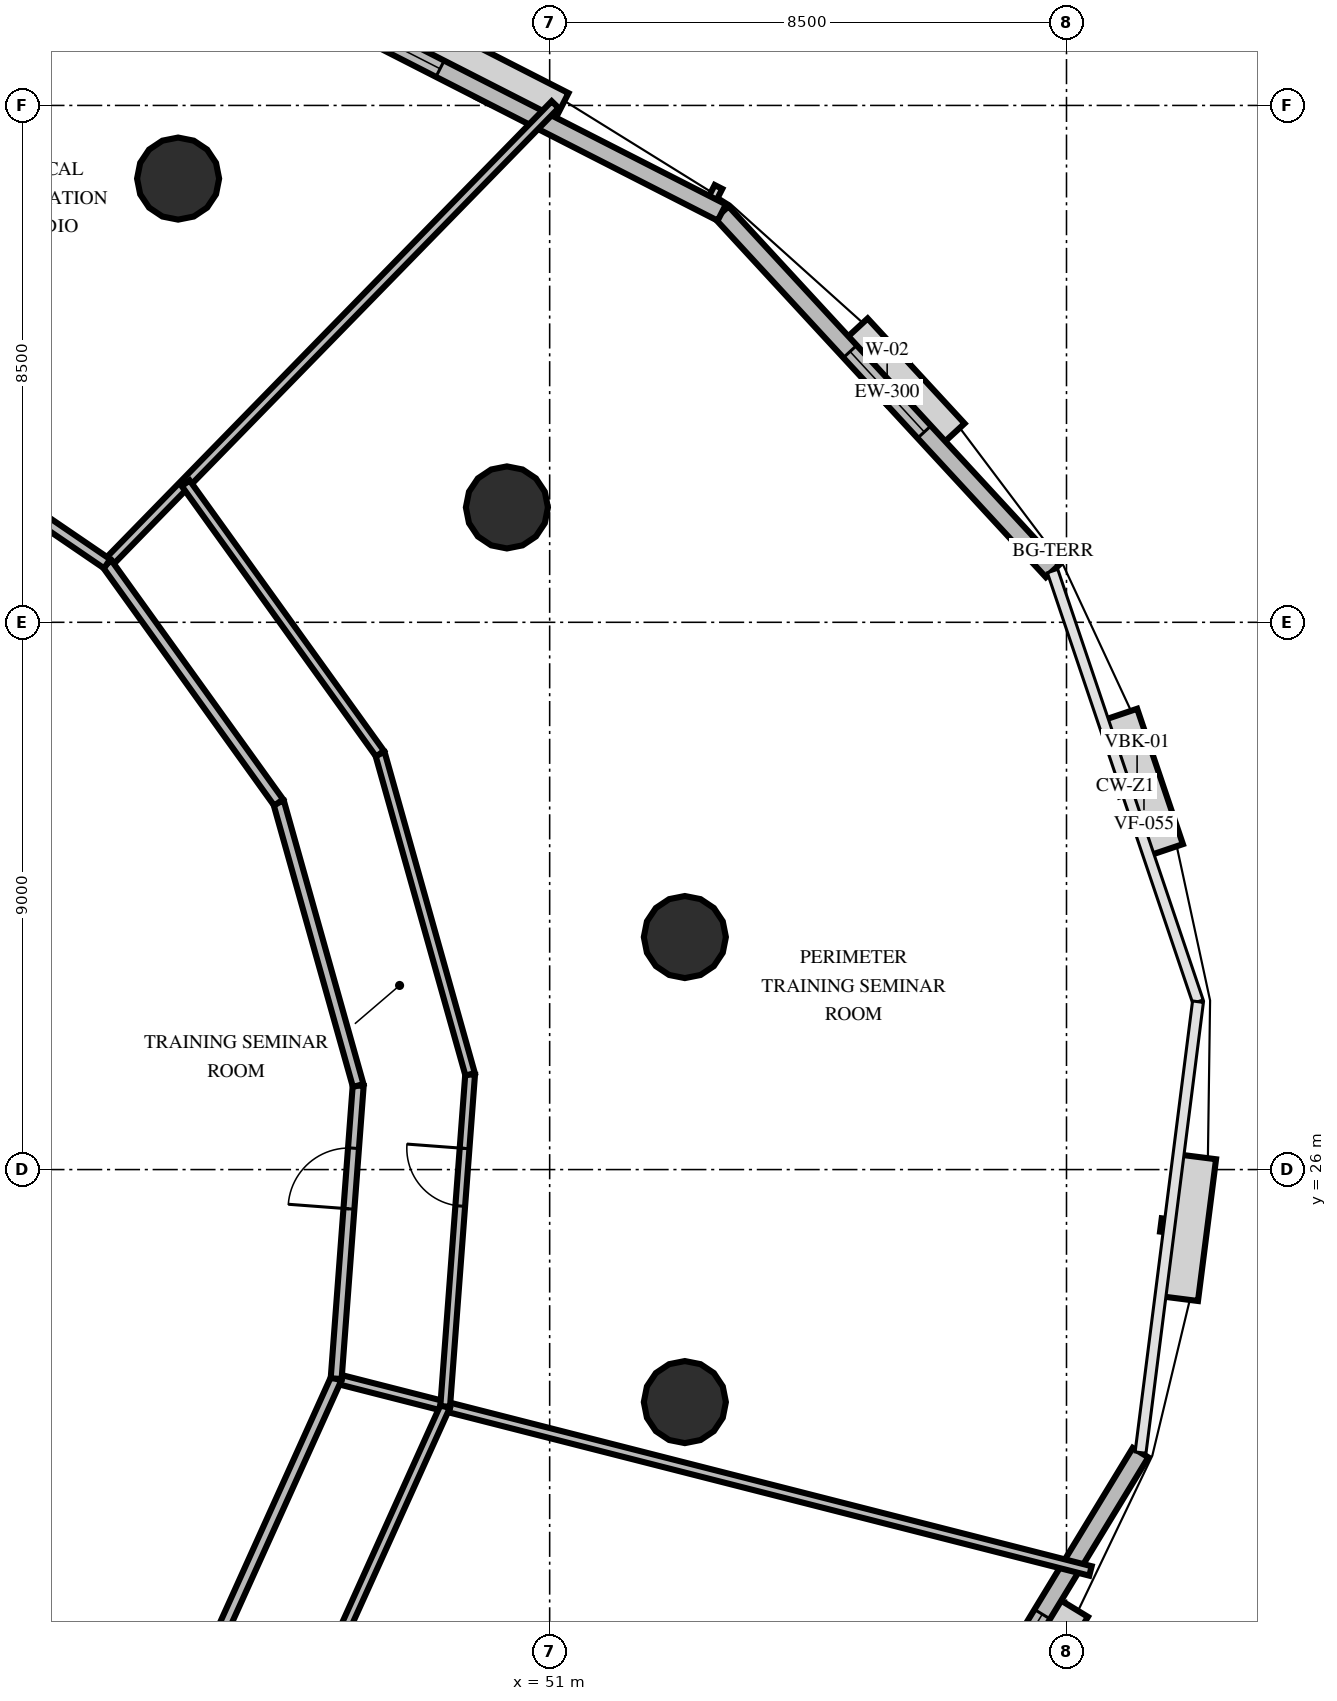
"""IFC4 building model, lengths in metres.
Left out: names, types, materials, properties, quantities, classifications, styles, units other than length and angle.
Written with IfcOpenShell. Run it as: python <this file> out.ifc"""

import sys

from ifc_helpers import new_model, si_unit, direction, frame, frame_2d, origin, origin_2d, place, context, subcontext, project, spatial, rectangle, circle, extrude, element, fill, save


model = new_model("IFC4")
c1 = context("Model", 3, precision=1e-05, world=origin(), true_north=direction((0.0, 1.0)))
c2 = subcontext(c1, "Body", "Model", "MODEL_VIEW")
j1 = project(units=[si_unit("LENGTHUNIT", "METRE"), si_unit("PLANEANGLEUNIT", "RADIAN")], contexts=[c1])
p1 = place(None, origin())
s1 = spatial("IfcSite", under=j1, at=p1, CompositionType="ELEMENT")
p2 = place(p1, origin())
s2 = spatial("IfcBuilding", under=s1, at=p2, CompositionType="ELEMENT")
p3 = place(p2, frame((0.0, 0.0, 55.2)))
s3 = spatial("IfcBuildingStorey", under=s2, at=p3, CompositionType="ELEMENT", Elevation=55.2)
for number, where, z_axis, x_axis in (
    (1, (53.223, 29.824, 0.0), (0.0, 0.0, 1.0), (1.0, 0.0, 0.0)),
    (2, (50.297, 36.889, 0.0), (0.0, 0.0, 1.0), (1.0, 0.0, 0.0)),
    (3, (44.889, 42.297, 0.0), (0.0, 0.0, 1.0), (1.0, 0.0, 0.0)),
    (4, (53.223, 22.176, 0.0), (0.0, 0.0, 1.0), (1.0, 0.0, 0.0)),
):
    element("IfcColumn", number, at=place(p3, frame(where, z_axis=z_axis, x_axis=x_axis)), inside=s3, PredefinedType="COLUMN", context=c2, shape_type="SweptSolid", body=[
        extrude(circle(Radius=0.675, at=origin_2d()), origin(), (0.0, 0.0, 1.0), 4.2),
    ])
p4 = place(p3, frame((59.271, 35.844, 0.0), z_axis=(0.0, 0.0, 1.0), x_axis=(-0.678156213245, 0.734917784815, 0.0)))
e5 = element("IfcWall", 5, at=p4, inside=s3, PredefinedType="SOLIDWALL", context=c2, shape_type="SweptSolid", body=[
    extrude(rectangle(XDim=8.022, YDim=0.3, at=frame_2d((4.011, 0.0))), origin(), (0.0, 0.0, 1.0), 3.0),
])
p5 = place(p4, frame((3.111, 0.0, 0.8)))
e6 = element("IfcOpeningElement", 6, at=p5, cuts=e5, PredefinedType="OPENING", context=c2, shape_type="SweptSolid", body=[
    extrude(rectangle(XDim=1.8, YDim=1.95, at=frame_2d((0.9, 0.975))), frame((0.0, 0.16, 0.0), z_axis=(0.0, -1.0, 0.0), x_axis=(1.0, 0.0, 0.0)), (0.0, 0.0, 1.0), 0.32),
])
p6 = place(p3, frame((53.831, 41.739, 0.0), z_axis=(0.0, 0.0, 1.0), x_axis=(-0.890709330384, 0.454573304063, 0.0)))
e7 = element("IfcWall", 7, at=p6, inside=s3, PredefinedType="SOLIDWALL", context=c2, shape_type="SweptSolid", body=[
    extrude(rectangle(XDim=8.792, YDim=0.3, at=frame_2d((4.396, 0.0))), origin(), (0.0, 0.0, 1.0), 3.0),
])
p7 = place(p6, frame((5.202, 0.0, 0.8)))
e8 = element("IfcOpeningElement", 8, at=p7, cuts=e7, PredefinedType="OPENING", context=c2, shape_type="SweptSolid", body=[
    extrude(rectangle(XDim=1.8, YDim=1.95, at=frame_2d((0.9, 0.975))), frame((0.0, 0.16, 0.0), z_axis=(0.0, -1.0, 0.0), x_axis=(1.0, 0.0, 0.0)), (0.0, 0.0, 1.0), 0.32),
])
p8 = place(p3, frame((56.551, 14.491, 0.0), z_axis=(0.0, 0.0, 1.0), x_axis=(0.519499833869, 0.854470551049, 0.0)))
e9 = element("IfcWall", 9, at=p8, inside=s3, PredefinedType="SOLIDWALL", context=c2, shape_type="SweptSolid", body=[
    extrude(rectangle(XDim=8.022, YDim=0.3, at=frame_2d((4.011, 0.0))), origin(), (0.0, 0.0, 1.0), 3.0),
])
p9 = place(p8, frame((3.111, 0.0, 0.8)))
e10 = element("IfcOpeningElement", 10, at=p9, cuts=e9, PredefinedType="OPENING", context=c2, shape_type="SweptSolid", body=[
    extrude(rectangle(XDim=1.8, YDim=1.95, at=frame_2d((0.9, 0.975))), frame((0.0, 0.16, 0.0), z_axis=(0.0, -1.0, 0.0), x_axis=(1.0, 0.0, 0.0)), (0.0, 0.0, 1.0), 0.32),
])
p10 = place(p3, frame((47.489, 22.562, 0.0), z_axis=(0.0, 0.0, 1.0), x_axis=(0.969016056797, -0.246997736163, 0.0)))
e11 = element("IfcWall", 11, at=p10, inside=s3, PredefinedType="PARTITIONING", context=c2, shape_type="SweptSolid", body=[
    extrude(rectangle(XDim=12.802, YDim=0.16, at=frame_2d((6.401, 0.0))), origin(), (0.0, 0.0, 1.0), 3.0),
])
p11 = place(p3, frame((45.499, 18.156, 0.0), z_axis=(0.0, 0.0, 1.0), x_axis=(0.411533950862, 0.911394430139, 0.0)))
e12 = element("IfcWall", 12, at=p11, inside=s3, PredefinedType="PARTITIONING", context=c2, shape_type="SweptSolid", body=[
    extrude(rectangle(XDim=4.834, YDim=0.18, at=frame_2d((2.417, 0.0))), origin(), (0.0, 0.0, 1.0), 3.0),
])
p12 = place(p3, frame((47.028, 17.113, 0.0), z_axis=(0.0, 0.0, 1.0), x_axis=(0.411541335113, 0.911391095795, 0.0)))
e13 = element("IfcWall", 13, at=p12, inside=s3, PredefinedType="PARTITIONING", context=c2, shape_type="SweptSolid", body=[
    extrude(rectangle(XDim=5.477, YDim=0.16, at=frame_2d((2.738, 0.0))), origin(), (0.0, 0.0, 1.0), 3.0),
])
p13 = place(p3, frame((43.722, 35.962, 0.0), z_axis=(0.0, 0.0, 1.0), x_axis=(0.698422740354, 0.715685458673, 0.0)))
e14 = element("IfcWall", 14, at=p13, inside=s3, PredefinedType="PARTITIONING", context=c2, shape_type="SweptSolid", body=[
    extrude(rectangle(XDim=10.551, YDim=0.16, at=frame_2d((5.275, 0.0))), origin(), (0.0, 0.0, 1.0), 3.0),
])
p14 = place(p3, frame((47.489, 22.562, 0.0), z_axis=(0.0, 0.0, 1.0), x_axis=(0.074993329919, 0.997184035406, 0.0)))
e15 = element("IfcWall", 15, at=p14, inside=s3, PredefinedType="PARTITIONING", context=c2, shape_type="SweptSolid", body=[
    extrude(rectangle(XDim=4.834, YDim=0.18, at=frame_2d((2.417, 0.0))), origin(), (0.0, 0.0, 1.0), 3.0),
])
p15 = place(p14, frame((2.801, 0.0, 0.0)))
e16 = element("IfcOpeningElement", 16, at=p15, cuts=e15, PredefinedType="OPENING", context=c2, shape_type="SweptSolid", body=[
    extrude(rectangle(XDim=1.0, YDim=2.15, at=frame_2d((0.5, 1.075))), frame((0.0, 0.1, 0.0), z_axis=(0.0, -1.0, 0.0), x_axis=(1.0, 0.0, 0.0)), (0.0, 0.0, 1.0), 0.2),
])
p16 = place(p3, frame((47.851, 27.383, 0.0), z_axis=(0.0, 0.0, 1.0), x_axis=(-0.270630041705, 0.962683426951, 0.0)))
e17 = element("IfcWall", 17, at=p16, inside=s3, PredefinedType="PARTITIONING", context=c2, shape_type="SweptSolid", body=[
    extrude(rectangle(XDim=4.834, YDim=0.18, at=frame_2d((2.417, 0.0))), origin(), (0.0, 0.0, 1.0), 3.0),
])
p17 = place(p3, frame((46.543, 32.037, 0.0), z_axis=(0.0, 0.0, 1.0), x_axis=(-0.583552796145, 0.812075202251, 0.0)))
e18 = element("IfcWall", 18, at=p17, inside=s3, PredefinedType="PARTITIONING", context=c2, shape_type="SweptSolid", body=[
    extrude(rectangle(XDim=4.834, YDim=0.18, at=frame_2d((2.417, 0.0))), origin(), (0.0, 0.0, 1.0), 3.0),
])
p18 = place(p3, frame((49.281, 22.105, 0.0), z_axis=(0.0, 0.0, 1.0), x_axis=(0.074930681693, 0.997188744893, 0.0)))
e19 = element("IfcWall", 19, at=p18, inside=s3, PredefinedType="PARTITIONING", context=c2, shape_type="SweptSolid", body=[
    extrude(rectangle(XDim=5.477, YDim=0.16, at=frame_2d((2.739, 0.0))), origin(), (0.0, 0.0, 1.0), 3.0),
])
p19 = place(p18, frame((3.305, 0.0, 0.0)))
e20 = element("IfcOpeningElement", 20, at=p19, cuts=e19, PredefinedType="OPENING", context=c2, shape_type="SweptSolid", body=[
    extrude(rectangle(XDim=0.95, YDim=2.15, at=frame_2d((0.475, 1.075))), frame((0.0, 0.09, 0.0), z_axis=(0.0, -1.0, 0.0), x_axis=(1.0, 0.0, 0.0)), (0.0, 0.0, 1.0), 0.18),
])
p20 = place(p3, frame((49.692, 27.566, 0.0), z_axis=(0.0, 0.0, 1.0), x_axis=(-0.270585497548, 0.962695948115, 0.0)))
e21 = element("IfcWall", 21, at=p20, inside=s3, PredefinedType="PARTITIONING", context=c2, shape_type="SweptSolid", body=[
    extrude(rectangle(XDim=5.477, YDim=0.16, at=frame_2d((2.738, 0.0))), origin(), (0.0, 0.0, 1.0), 3.0),
])
p21 = place(p3, frame((48.21, 32.839, 0.0), z_axis=(0.0, 0.0, 1.0), x_axis=(-0.5835423575, 0.812082703303, 0.0)))
e22 = element("IfcWall", 22, at=p21, inside=s3, PredefinedType="PARTITIONING", context=c2, shape_type="SweptSolid", body=[
    extrude(rectangle(XDim=5.477, YDim=0.16, at=frame_2d((2.739, 0.0))), origin(), (0.0, 0.0, 1.0), 3.0),
])
p22 = place(p3, frame((43.722, 35.962, 0.0), z_axis=(0.0, 0.0, 1.0), x_axis=(-0.826090560553, 0.563537386307, 0.0)))
e23 = element("IfcWall", 23, at=p22, inside=s3, PredefinedType="PARTITIONING", context=c2, shape_type="SweptSolid", body=[
    extrude(rectangle(XDim=4.834, YDim=0.18, at=frame_2d((2.417, 0.0))), origin(), (0.0, 0.0, 1.0), 3.0),
])
p23 = place(p5, origin())
e24 = element("IfcWindow", 24, at=p23, inside=s3, PartitioningType="SINGLE_PANEL", PredefinedType="WINDOW", context=c2, shape_type="SweptSolid", body=[
    extrude(rectangle(XDim=1.8, YDim=1.95, at=frame_2d((0.9, 0.975))), frame((0.0, 0.03, 0.0), z_axis=(0.0, -1.0, 0.0), x_axis=(1.0, 0.0, 0.0)), (0.0, 0.0, 1.0), 0.06),
])
fill(e6, e24)
p24 = place(p7, origin())
e25 = element("IfcWindow", 25, at=p24, inside=s3, PartitioningType="SINGLE_PANEL", PredefinedType="WINDOW", context=c2, shape_type="SweptSolid", body=[
    extrude(rectangle(XDim=1.8, YDim=1.95, at=frame_2d((0.9, 0.975))), frame((0.0, 0.03, 0.0), z_axis=(0.0, -1.0, 0.0), x_axis=(1.0, 0.0, 0.0)), (0.0, 0.0, 1.0), 0.06),
])
fill(e8, e25)
p25 = place(p9, origin())
e26 = element("IfcWindow", 26, at=p25, inside=s3, PartitioningType="SINGLE_PANEL", PredefinedType="WINDOW", context=c2, shape_type="SweptSolid", body=[
    extrude(rectangle(XDim=1.8, YDim=1.95, at=frame_2d((0.9, 0.975))), frame((0.0, 0.03, 0.0), z_axis=(0.0, -1.0, 0.0), x_axis=(1.0, 0.0, 0.0)), (0.0, 0.0, 1.0), 0.06),
])
fill(e10, e26)
p26 = place(p15, origin())
e27 = element("IfcDoor", 27, at=p26, inside=s3, OperationType="SINGLE_SWING_LEFT", PredefinedType="DOOR", context=c2, shape_type="SweptSolid", body=[
    extrude(rectangle(XDim=1.0, YDim=2.15, at=frame_2d((0.5, 1.075))), frame((0.0, 0.025, 0.0), z_axis=(0.0, -1.0, 0.0), x_axis=(1.0, 0.0, 0.0)), (0.0, 0.0, 1.0), 0.05),
])
fill(e16, e27)
p27 = place(p19, origin())
e28 = element("IfcDoor", 28, at=p27, inside=s3, OperationType="SINGLE_SWING_RIGHT", PredefinedType="DOOR", context=c2, shape_type="SweptSolid", body=[
    extrude(rectangle(XDim=0.95, YDim=2.15, at=frame_2d((0.475, 1.075))), frame((0.0, 0.025, 0.0), z_axis=(0.0, -1.0, 0.0), x_axis=(1.0, 0.0, 0.0)), (0.0, 0.0, 1.0), 0.05),
])
fill(e20, e28)
save(model, sys.argv[1])
